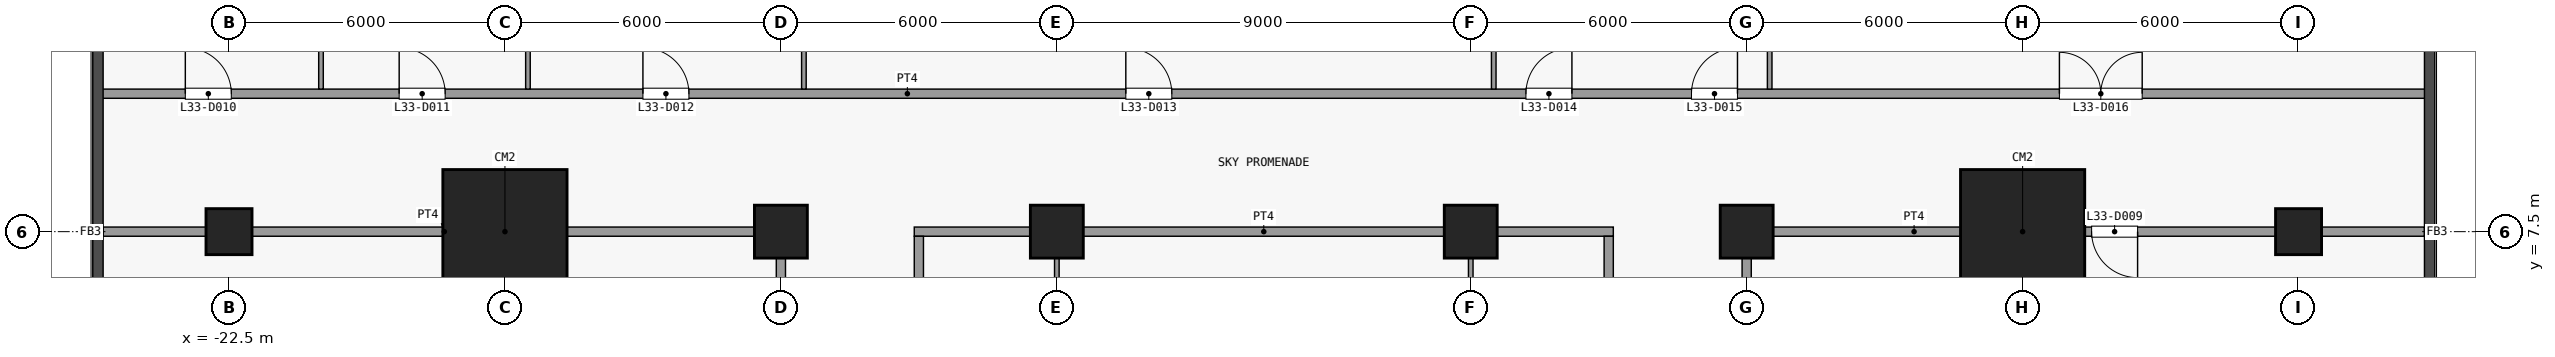
"""IFC4 building model, lengths in metres.
Left out: names, types, materials, properties, quantities, classifications, styles, units other than length and angle.
Written with IfcOpenShell. Run it as: python <this file> out.ifc"""

import sys

from ifc_helpers import new_model, si_unit, direction, frame, frame_2d, origin, origin_2d, place, context, subcontext, project, spatial, rectangle, extrude, element, fill, save


model = new_model("IFC4")
c1 = context("Model", 3, precision=1e-05, world=origin(), true_north=direction((0.0, 1.0)))
c2 = subcontext(c1, "Body", "Model", "MODEL_VIEW")
j1 = project(units=[si_unit("LENGTHUNIT", "METRE"), si_unit("PLANEANGLEUNIT", "RADIAN")], contexts=[c1])
p1 = place(None, origin())
s1 = spatial("IfcSite", under=j1, at=p1, CompositionType="ELEMENT")
p2 = place(p1, origin())
s2 = spatial("IfcBuilding", under=s1, at=p2, CompositionType="ELEMENT")
p3 = place(p2, frame((0.0, 0.0, 133.9)))
s3 = spatial("IfcBuildingStorey", under=s2, at=p3, CompositionType="ELEMENT", Elevation=133.9)
p4 = place(p3, frame((-22.5, 7.5, 0.0), z_axis=(0.0, 0.0, 1.0), x_axis=(1.0, 0.0, 0.0)))
e1 = element("IfcColumn", 1, at=p4, inside=s3, PredefinedType="COLUMN", context=c2, shape_type="SweptSolid", body=[
    extrude(rectangle(XDim=1.0, YDim=1.0, at=origin_2d()), origin(), (0.0, 0.0, 1.0), 5.0),
])
p5 = place(p3, frame((-16.5, 7.5, 0.0), z_axis=(0.0, 0.0, 1.0), x_axis=(1.0, 0.0, 0.0)))
e2 = element("IfcColumn", 2, at=p5, inside=s3, PredefinedType="COLUMN", context=c2, shape_type="SweptSolid", body=[
    extrude(rectangle(XDim=2.7, YDim=2.7, at=origin_2d()), origin(), (0.0, 0.0, 1.0), 5.0),
])
for number, where, z_axis, x_axis in (
    (3, (-10.5, 7.5, 0.0), (0.0, 0.0, 1.0), (1.0, 0.0, 0.0)),
    (4, (-4.5, 7.5, 0.0), (0.0, 0.0, 1.0), (1.0, 0.0, 0.0)),
    (5, (4.5, 7.5, 0.0), (0.0, 0.0, 1.0), (1.0, 0.0, 0.0)),
    (6, (10.5, 7.5, 0.0), (0.0, 0.0, 1.0), (1.0, 0.0, 0.0)),
):
    element("IfcColumn", number, at=place(p3, frame(where, z_axis=z_axis, x_axis=x_axis)), inside=s3, PredefinedType="COLUMN", context=c2, shape_type="SweptSolid", body=[
        extrude(rectangle(XDim=1.15, YDim=1.15, at=origin_2d()), origin(), (0.0, 0.0, 1.0), 5.0),
    ])
p6 = place(p3, frame((16.5, 7.5, 0.0), z_axis=(0.0, 0.0, 1.0), x_axis=(1.0, 0.0, 0.0)))
e7 = element("IfcColumn", 7, at=p6, inside=s3, PredefinedType="COLUMN", context=c2, shape_type="SweptSolid", body=[
    extrude(rectangle(XDim=2.7, YDim=2.7, at=origin_2d()), origin(), (0.0, 0.0, 1.0), 5.0),
])
p7 = place(p3, frame((22.5, 7.5, 0.0), z_axis=(0.0, 0.0, 1.0), x_axis=(1.0, 0.0, 0.0)))
e8 = element("IfcColumn", 8, at=p7, inside=s3, PredefinedType="COLUMN", context=c2, shape_type="SweptSolid", body=[
    extrude(rectangle(XDim=1.0, YDim=1.0, at=origin_2d()), origin(), (0.0, 0.0, 1.0), 5.0),
])
p8 = place(p3, frame((-25.238, 7.5, 0.0), z_axis=(0.0, 0.0, 1.0), x_axis=(1.0, 0.0, 0.0)))
e9 = element("IfcWall", 9, at=p8, inside=s3, PredefinedType="PARTITIONING", context=c2, shape_type="SweptSolid", body=[
    extrude(rectangle(XDim=14.838, YDim=0.2, at=frame_2d((7.419, 0.0))), origin(), (0.0, 0.0, 1.0), 4.7),
])
p9 = place(p3, frame((-7.6, 7.5, 0.0), z_axis=(0.0, 0.0, 1.0), x_axis=(1.0, 0.0, 0.0)))
e10 = element("IfcWall", 10, at=p9, inside=s3, PredefinedType="PARTITIONING", context=c2, shape_type="SweptSolid", body=[
    extrude(rectangle(XDim=15.2, YDim=0.2, at=frame_2d((7.6, 0.0))), origin(), (0.0, 0.0, 1.0), 4.7),
])
p10 = place(p3, frame((10.4, 7.5, 0.0), z_axis=(0.0, 0.0, 1.0), x_axis=(1.0, 0.0, 0.0)))
e11 = element("IfcWall", 11, at=p10, inside=s3, PredefinedType="PARTITIONING", context=c2, shape_type="SweptSolid", body=[
    extrude(rectangle(XDim=14.838, YDim=0.2, at=frame_2d((7.419, 0.0))), origin(), (0.0, 0.0, 1.0), 4.7),
])
p11 = place(p10, frame((7.6, 0.0, 0.0)))
e12 = element("IfcOpeningElement", 12, at=p11, cuts=e11, PredefinedType="OPENING", context=c2, shape_type="SweptSolid", body=[
    extrude(rectangle(XDim=1.0, YDim=2.1, at=frame_2d((0.5, 1.05))), frame((0.0, 0.11, 0.0), z_axis=(0.0, -1.0, 0.0), x_axis=(1.0, 0.0, 0.0)), (0.0, 0.0, 1.0), 0.22),
])
p12 = place(p3, frame((-25.35, 10.5, 0.0), z_axis=(0.0, 0.0, 1.0), x_axis=(1.0, 0.0, 0.0)))
e13 = element("IfcWall", 13, at=p12, inside=s3, PredefinedType="PARTITIONING", context=c2, shape_type="SweptSolid", body=[
    extrude(rectangle(XDim=50.7, YDim=0.2, at=frame_2d((25.35, 0.0))), origin(), (0.0, 0.0, 1.0), 4.7),
])
p13 = place(p12, frame((1.9, 0.0, 0.0)))
e14 = element("IfcOpeningElement", 14, at=p13, cuts=e13, PredefinedType="OPENING", context=c2, shape_type="SweptSolid", body=[
    extrude(rectangle(XDim=1.0, YDim=2.1, at=frame_2d((0.5, 1.05))), frame((0.0, 0.11, 0.0), z_axis=(0.0, -1.0, 0.0), x_axis=(1.0, 0.0, 0.0)), (0.0, 0.0, 1.0), 0.22),
])
p14 = place(p12, frame((6.55, 0.0, 0.0)))
e15 = element("IfcOpeningElement", 15, at=p14, cuts=e13, PredefinedType="OPENING", context=c2, shape_type="SweptSolid", body=[
    extrude(rectangle(XDim=1.0, YDim=2.1, at=frame_2d((0.5, 1.05))), frame((0.0, 0.11, 0.0), z_axis=(0.0, -1.0, 0.0), x_axis=(1.0, 0.0, 0.0)), (0.0, 0.0, 1.0), 0.22),
])
p15 = place(p12, frame((11.85, 0.0, 0.0)))
e16 = element("IfcOpeningElement", 16, at=p15, cuts=e13, PredefinedType="OPENING", context=c2, shape_type="SweptSolid", body=[
    extrude(rectangle(XDim=1.0, YDim=2.1, at=frame_2d((0.5, 1.05))), frame((0.0, 0.11, 0.0), z_axis=(0.0, -1.0, 0.0), x_axis=(1.0, 0.0, 0.0)), (0.0, 0.0, 1.0), 0.22),
])
p16 = place(p12, frame((22.35, 0.0, 0.0)))
e17 = element("IfcOpeningElement", 17, at=p16, cuts=e13, PredefinedType="OPENING", context=c2, shape_type="SweptSolid", body=[
    extrude(rectangle(XDim=1.0, YDim=2.1, at=frame_2d((0.5, 1.05))), frame((0.0, 0.11, 0.0), z_axis=(0.0, -1.0, 0.0), x_axis=(1.0, 0.0, 0.0)), (0.0, 0.0, 1.0), 0.22),
])
p17 = place(p12, frame((31.05, 0.0, 0.0)))
e18 = element("IfcOpeningElement", 18, at=p17, cuts=e13, PredefinedType="OPENING", context=c2, shape_type="SweptSolid", body=[
    extrude(rectangle(XDim=1.0, YDim=2.1, at=frame_2d((0.5, 1.05))), frame((0.0, 0.11, 0.0), z_axis=(0.0, -1.0, 0.0), x_axis=(1.0, 0.0, 0.0)), (0.0, 0.0, 1.0), 0.22),
])
p18 = place(p12, frame((34.65, 0.0, 0.0)))
e19 = element("IfcOpeningElement", 19, at=p18, cuts=e13, PredefinedType="OPENING", context=c2, shape_type="SweptSolid", body=[
    extrude(rectangle(XDim=1.0, YDim=2.1, at=frame_2d((0.5, 1.05))), frame((0.0, 0.11, 0.0), z_axis=(0.0, -1.0, 0.0), x_axis=(1.0, 0.0, 0.0)), (0.0, 0.0, 1.0), 0.22),
])
p19 = place(p12, frame((42.65, 0.0, 0.0)))
e20 = element("IfcOpeningElement", 20, at=p19, cuts=e13, PredefinedType="OPENING", context=c2, shape_type="SweptSolid", body=[
    extrude(rectangle(XDim=1.8, YDim=2.1, at=frame_2d((0.9, 1.05))), frame((0.0, 0.11, 0.0), z_axis=(0.0, -1.0, 0.0), x_axis=(1.0, 0.0, 0.0)), (0.0, 0.0, 1.0), 0.22),
])
for number, where, z_axis, x_axis in (
    (21, (-20.5, 10.6, 0.0), (0.0, 0.0, 1.0), (0.0, 1.0, 0.0)),
    (22, (-16.0, 10.6, 0.0), (0.0, 0.0, 1.0), (0.0, 1.0, 0.0)),
):
    element("IfcWall", number, at=place(p3, frame(where, z_axis=z_axis, x_axis=x_axis)), inside=s3, PredefinedType="PARTITIONING", context=c2, shape_type="SweptSolid", body=[
        extrude(rectangle(XDim=5.85, YDim=0.1, at=frame_2d((2.925, 0.0))), origin(), (0.0, 0.0, 1.0), 4.7),
    ])
p20 = place(p3, frame((-10.5, -4.4, 0.0), z_axis=(0.0, 0.0, 1.0), x_axis=(0.0, 1.0, 0.0)))
e23 = element("IfcWall", 23, at=p20, inside=s3, PredefinedType="PARTITIONING", context=c2, shape_type="SweptSolid", body=[
    extrude(rectangle(XDim=11.8, YDim=0.2, at=frame_2d((5.9, 0.0))), origin(), (0.0, 0.0, 1.0), 4.7),
])
p21 = place(p3, frame((-10.0, 10.6, 0.0), z_axis=(0.0, 0.0, 1.0), x_axis=(0.0, 1.0, 0.0)))
e24 = element("IfcWall", 24, at=p21, inside=s3, PredefinedType="PARTITIONING", context=c2, shape_type="SweptSolid", body=[
    extrude(rectangle(XDim=11.637, YDim=0.1, at=frame_2d((5.819, 0.0))), origin(), (0.0, 0.0, 1.0), 4.7),
])
p22 = place(p3, frame((-7.5, -4.4, 0.0), z_axis=(0.0, 0.0, 1.0), x_axis=(0.0, 1.0, 0.0)))
e25 = element("IfcWall", 25, at=p22, inside=s3, PredefinedType="PARTITIONING", context=c2, shape_type="SweptSolid", body=[
    extrude(rectangle(XDim=11.8, YDim=0.2, at=frame_2d((5.9, 0.0))), origin(), (0.0, 0.0, 1.0), 4.7),
])
p23 = place(p22, frame((5.4, 0.0, 0.0)))
e26 = element("IfcOpeningElement", 26, at=p23, cuts=e25, PredefinedType="OPENING", context=c2, shape_type="SweptSolid", body=[
    extrude(rectangle(XDim=1.0, YDim=2.1, at=frame_2d((0.5, 1.05))), frame((0.0, 0.11, 0.0), z_axis=(0.0, -1.0, 0.0), x_axis=(1.0, 0.0, 0.0)), (0.0, 0.0, 1.0), 0.22),
])
for number, where, z_axis, x_axis in (
    (27, (-4.5, -4.4, 0.0), (0.0, 0.0, 1.0), (0.0, 1.0, 0.0)),
    (28, (4.5, -4.4, 0.0), (0.0, 0.0, 1.0), (0.0, 1.0, 0.0)),
):
    element("IfcWall", number, at=place(p3, frame(where, z_axis=z_axis, x_axis=x_axis)), inside=s3, PredefinedType="PARTITIONING", context=c2, shape_type="SweptSolid", body=[
        extrude(rectangle(XDim=11.8, YDim=0.1, at=frame_2d((5.9, 0.0))), origin(), (0.0, 0.0, 1.0), 4.7),
    ])
p24 = place(p3, frame((5.0, 10.6, 0.0), z_axis=(0.0, 0.0, 1.0), x_axis=(0.0, 1.0, 0.0)))
e29 = element("IfcWall", 29, at=p24, inside=s3, PredefinedType="PARTITIONING", context=c2, shape_type="SweptSolid", body=[
    extrude(rectangle(XDim=11.637, YDim=0.1, at=frame_2d((5.819, 0.0))), origin(), (0.0, 0.0, 1.0), 4.7),
])
p25 = place(p3, frame((7.5, -4.4, 0.0), z_axis=(0.0, 0.0, 1.0), x_axis=(0.0, 1.0, 0.0)))
e30 = element("IfcWall", 30, at=p25, inside=s3, PredefinedType="PARTITIONING", context=c2, shape_type="SweptSolid", body=[
    extrude(rectangle(XDim=11.8, YDim=0.2, at=frame_2d((5.9, 0.0))), origin(), (0.0, 0.0, 1.0), 4.7),
])
p26 = place(p25, frame((5.4, 0.0, 0.0)))
e31 = element("IfcOpeningElement", 31, at=p26, cuts=e30, PredefinedType="OPENING", context=c2, shape_type="SweptSolid", body=[
    extrude(rectangle(XDim=1.0, YDim=2.1, at=frame_2d((0.5, 1.05))), frame((0.0, 0.11, 0.0), z_axis=(0.0, -1.0, 0.0), x_axis=(1.0, 0.0, 0.0)), (0.0, 0.0, 1.0), 0.22),
])
p27 = place(p3, frame((10.5, -4.4, 0.0), z_axis=(0.0, 0.0, 1.0), x_axis=(0.0, 1.0, 0.0)))
e32 = element("IfcWall", 32, at=p27, inside=s3, PredefinedType="PARTITIONING", context=c2, shape_type="SweptSolid", body=[
    extrude(rectangle(XDim=11.8, YDim=0.2, at=frame_2d((5.9, 0.0))), origin(), (0.0, 0.0, 1.0), 4.7),
])
p28 = place(p3, frame((11.0, 10.6, 0.0), z_axis=(0.0, 0.0, 1.0), x_axis=(0.0, 1.0, 0.0)))
e33 = element("IfcWall", 33, at=p28, inside=s3, PredefinedType="PARTITIONING", context=c2, shape_type="SweptSolid", body=[
    extrude(rectangle(XDim=11.637, YDim=0.1, at=frame_2d((5.819, 0.0))), origin(), (0.0, 0.0, 1.0), 4.7),
])
p29 = place(p11, origin())
e34 = element("IfcDoor", 34, at=p29, inside=s3, OperationType="SINGLE_SWING_RIGHT", PredefinedType="DOOR", context=c2, shape_type="SweptSolid", body=[
    extrude(rectangle(XDim=1.0, YDim=2.1, at=frame_2d((0.5, 1.05))), frame((0.0, 0.025, 0.0), z_axis=(0.0, -1.0, 0.0), x_axis=(1.0, 0.0, 0.0)), (0.0, 0.0, 1.0), 0.05),
])
fill(e12, e34)
p30 = place(p13, origin())
e35 = element("IfcDoor", 35, at=p30, inside=s3, OperationType="SINGLE_SWING_RIGHT", PredefinedType="DOOR", context=c2, shape_type="SweptSolid", body=[
    extrude(rectangle(XDim=1.0, YDim=2.1, at=frame_2d((0.5, 1.05))), frame((0.0, 0.025, 0.0), z_axis=(0.0, -1.0, 0.0), x_axis=(1.0, 0.0, 0.0)), (0.0, 0.0, 1.0), 0.05),
])
fill(e14, e35)
p31 = place(p14, origin())
e36 = element("IfcDoor", 36, at=p31, inside=s3, OperationType="SINGLE_SWING_RIGHT", PredefinedType="DOOR", context=c2, shape_type="SweptSolid", body=[
    extrude(rectangle(XDim=1.0, YDim=2.1, at=frame_2d((0.5, 1.05))), frame((0.0, 0.025, 0.0), z_axis=(0.0, -1.0, 0.0), x_axis=(1.0, 0.0, 0.0)), (0.0, 0.0, 1.0), 0.05),
])
fill(e15, e36)
p32 = place(p15, origin())
e37 = element("IfcDoor", 37, at=p32, inside=s3, OperationType="SINGLE_SWING_RIGHT", PredefinedType="DOOR", context=c2, shape_type="SweptSolid", body=[
    extrude(rectangle(XDim=1.0, YDim=2.1, at=frame_2d((0.5, 1.05))), frame((0.0, 0.025, 0.0), z_axis=(0.0, -1.0, 0.0), x_axis=(1.0, 0.0, 0.0)), (0.0, 0.0, 1.0), 0.05),
])
fill(e16, e37)
p33 = place(p16, origin())
e38 = element("IfcDoor", 38, at=p33, inside=s3, OperationType="SINGLE_SWING_RIGHT", PredefinedType="DOOR", context=c2, shape_type="SweptSolid", body=[
    extrude(rectangle(XDim=1.0, YDim=2.1, at=frame_2d((0.5, 1.05))), frame((0.0, 0.025, 0.0), z_axis=(0.0, -1.0, 0.0), x_axis=(1.0, 0.0, 0.0)), (0.0, 0.0, 1.0), 0.05),
])
fill(e17, e38)
p34 = place(p17, origin())
e39 = element("IfcDoor", 39, at=p34, inside=s3, OperationType="SINGLE_SWING_LEFT", PredefinedType="DOOR", context=c2, shape_type="SweptSolid", body=[
    extrude(rectangle(XDim=1.0, YDim=2.1, at=frame_2d((0.5, 1.05))), frame((0.0, 0.025, 0.0), z_axis=(0.0, -1.0, 0.0), x_axis=(1.0, 0.0, 0.0)), (0.0, 0.0, 1.0), 0.05),
])
fill(e18, e39)
p35 = place(p18, origin())
e40 = element("IfcDoor", 40, at=p35, inside=s3, OperationType="SINGLE_SWING_LEFT", PredefinedType="DOOR", context=c2, shape_type="SweptSolid", body=[
    extrude(rectangle(XDim=1.0, YDim=2.1, at=frame_2d((0.5, 1.05))), frame((0.0, 0.025, 0.0), z_axis=(0.0, -1.0, 0.0), x_axis=(1.0, 0.0, 0.0)), (0.0, 0.0, 1.0), 0.05),
])
fill(e19, e40)
p36 = place(p19, origin())
e41 = element("IfcDoor", 41, at=p36, inside=s3, OperationType="DOUBLE_DOOR_SINGLE_SWING", PredefinedType="DOOR", context=c2, shape_type="SweptSolid", body=[
    extrude(rectangle(XDim=1.8, YDim=2.1, at=frame_2d((0.9, 1.05))), frame((0.0, 0.025, 0.0), z_axis=(0.0, -1.0, 0.0), x_axis=(1.0, 0.0, 0.0)), (0.0, 0.0, 1.0), 0.05),
])
fill(e20, e41)
save(model, sys.argv[1])
